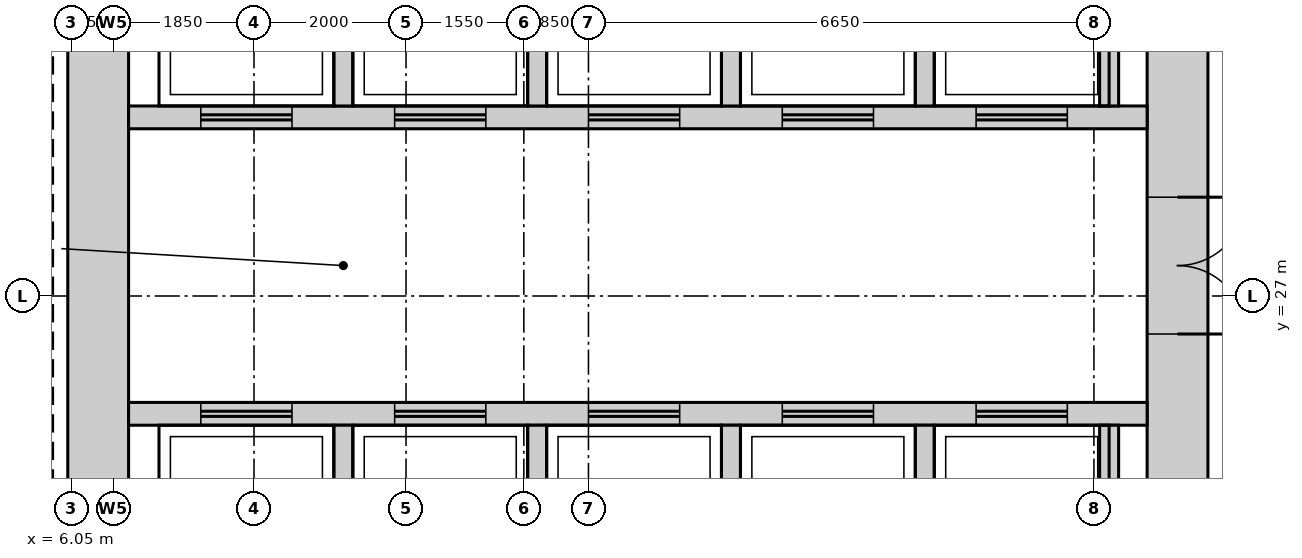
"""IFC4 building model, lengths in metres.
Left out: names, types, materials, properties, quantities, classifications, styles, units other than length and angle.
Written with IfcOpenShell. Run it as: python <this file> out.ifc"""

import sys

from ifc_helpers import new_model, si_unit, direction, frame, frame_2d, origin, place, context, subcontext, project, spatial, rectangle, extrude, source, transform, mapped, element, fill, save


model = new_model("IFC4")
c1 = context("Model", 3, precision=1e-05, world=origin(), true_north=direction((0.0, 1.0)))
c2 = subcontext(c1, "Body", "Model", "MODEL_VIEW")
j1 = project(units=[si_unit("LENGTHUNIT", "METRE"), si_unit("PLANEANGLEUNIT", "RADIAN")], contexts=[c1])
p1 = place(None, origin())
s1 = spatial("IfcSite", under=j1, at=p1, CompositionType="ELEMENT")
p2 = place(p1, origin())
s2 = spatial("IfcBuilding", under=s1, at=p2, CompositionType="ELEMENT")
p3 = place(p2, frame((0.0, 0.0, 208.7)))
s3 = spatial("IfcBuildingStorey", under=s2, at=p3, CompositionType="ELEMENT", Elevation=208.7)
m1 = source(origin(), c2, "Body", "SweptSolid", [
    extrude(rectangle(XDim=22.4, YDim=0.8, at=frame_2d((11.2, 0.0))), origin(), (0.0, 0.0, 1.0), 3.75),
])
p4 = place(p3, frame((20.6, 15.8, 0.0), z_axis=(0.0, 0.0, 1.0), x_axis=(0.0, 1.0, 0.0)))
e1 = element("IfcWall", 1, at=p4, inside=s3, PredefinedType="SHEAR", context=c2, shape_type="MappedRepresentation", body=[
    mapped(m1, transform((0.0, 0.0, 0.0))),
])
m2 = source(origin(), c2, "Body", "SweptSolid", [
    extrude(rectangle(XDim=1.8, YDim=2.1, at=frame_2d((0.9, 1.05))), frame((0.0, 0.41, 0.0), z_axis=(0.0, -1.0, 0.0), x_axis=(1.0, 0.0, 0.0)), (0.0, 0.0, 1.0), 0.82),
])
p5 = place(p4, frame((10.7, 0.0, 0.0)))
e2 = element("IfcOpeningElement", 2, at=p5, cuts=e1, PredefinedType="OPENING", context=c2, shape_type="MappedRepresentation", body=[
    mapped(m2, transform((0.0, 0.0, 0.0))),
])
m3 = source(origin(), c2, "Body", "SweptSolid", [
    extrude(rectangle(XDim=0.9, YDim=2.1, at=frame_2d((0.45, 1.05))), frame((0.0, 0.41, 0.0), z_axis=(0.0, -1.0, 0.0), x_axis=(1.0, 0.0, 0.0)), (0.0, 0.0, 1.0), 0.82),
])
p6 = place(p4, frame((0.35, 0.0, 0.0)))
e3 = element("IfcOpeningElement", 3, at=p6, cuts=e1, PredefinedType="OPENING", context=c2, shape_type="MappedRepresentation", body=[
    mapped(m3, transform((0.0, 0.0, 0.0))),
])
p7 = place(p4, frame((3.9, 0.0, 0.0)))
e4 = element("IfcOpeningElement", 4, at=p7, cuts=e1, PredefinedType="OPENING", context=c2, shape_type="MappedRepresentation", body=[
    mapped(m3, transform((0.0, 0.0, 0.0))),
])
p8 = place(p3, frame((6.4, 15.8, 0.0), z_axis=(0.0, 0.0, 1.0), x_axis=(0.0, 1.0, 0.0)))
e5 = element("IfcWall", 5, at=p8, inside=s3, PredefinedType="SHEAR", context=c2, shape_type="MappedRepresentation", body=[
    mapped(m1, transform((0.0, 0.0, 0.0))),
])
m4 = source(origin(), c2, "Body", "SweptSolid", [
    extrude(rectangle(XDim=13.4, YDim=0.3, at=frame_2d((6.7, 0.0))), origin(), (0.0, 0.0, 1.0), 3.75),
])
p9 = place(p3, frame((6.8, 29.35, 0.0), z_axis=(0.0, 0.0, 1.0), x_axis=(1.0, 0.0, 0.0)))
e6 = element("IfcWall", 6, at=p9, inside=s3, PredefinedType="STANDARD", context=c2, shape_type="MappedRepresentation", body=[
    mapped(m4, transform((0.0, 0.0, 0.0))),
])
m5 = source(origin(), c2, "Body", "SweptSolid", [
    extrude(rectangle(XDim=1.2, YDim=2.1, at=frame_2d((0.6, 1.05))), frame((0.0, 0.16, 0.0), z_axis=(0.0, -1.0, 0.0), x_axis=(1.0, 0.0, 0.0)), (0.0, 0.0, 1.0), 0.32),
])
p10 = place(p9, frame((0.95, 0.0, 0.0)))
e7 = element("IfcOpeningElement", 7, at=p10, cuts=e6, PredefinedType="OPENING", context=c2, shape_type="MappedRepresentation", body=[
    mapped(m5, transform((0.0, 0.0, 0.0))),
])
p11 = place(p9, frame((3.5, 0.0, 0.0)))
e8 = element("IfcOpeningElement", 8, at=p11, cuts=e6, PredefinedType="OPENING", context=c2, shape_type="MappedRepresentation", body=[
    mapped(m5, transform((0.0, 0.0, 0.0))),
])
p12 = place(p9, frame((6.05, 0.0, 0.0)))
e9 = element("IfcOpeningElement", 9, at=p12, cuts=e6, PredefinedType="OPENING", context=c2, shape_type="MappedRepresentation", body=[
    mapped(m5, transform((0.0, 0.0, 0.0))),
])
p13 = place(p9, frame((8.6, 0.0, 0.0)))
e10 = element("IfcOpeningElement", 10, at=p13, cuts=e6, PredefinedType="OPENING", context=c2, shape_type="MappedRepresentation", body=[
    mapped(m5, transform((0.0, 0.0, 0.0))),
])
p14 = place(p9, frame((11.15, 0.0, 0.0)))
e11 = element("IfcOpeningElement", 11, at=p14, cuts=e6, PredefinedType="OPENING", context=c2, shape_type="MappedRepresentation", body=[
    mapped(m5, transform((0.0, 0.0, 0.0))),
])
p15 = place(p3, frame((6.8, 25.45, 0.0), z_axis=(0.0, 0.0, 1.0), x_axis=(1.0, 0.0, 0.0)))
e12 = element("IfcWall", 12, at=p15, inside=s3, PredefinedType="STANDARD", context=c2, shape_type="MappedRepresentation", body=[
    mapped(m4, transform((0.0, 0.0, 0.0))),
])
p16 = place(p15, frame((0.95, 0.0, 0.0)))
e13 = element("IfcOpeningElement", 13, at=p16, cuts=e12, PredefinedType="OPENING", context=c2, shape_type="MappedRepresentation", body=[
    mapped(m5, transform((0.0, 0.0, 0.0))),
])
p17 = place(p15, frame((3.5, 0.0, 0.0)))
e14 = element("IfcOpeningElement", 14, at=p17, cuts=e12, PredefinedType="OPENING", context=c2, shape_type="MappedRepresentation", body=[
    mapped(m5, transform((0.0, 0.0, 0.0))),
])
p18 = place(p15, frame((6.05, 0.0, 0.0)))
e15 = element("IfcOpeningElement", 15, at=p18, cuts=e12, PredefinedType="OPENING", context=c2, shape_type="MappedRepresentation", body=[
    mapped(m5, transform((0.0, 0.0, 0.0))),
])
p19 = place(p15, frame((8.6, 0.0, 0.0)))
e16 = element("IfcOpeningElement", 16, at=p19, cuts=e12, PredefinedType="OPENING", context=c2, shape_type="MappedRepresentation", body=[
    mapped(m5, transform((0.0, 0.0, 0.0))),
])
p20 = place(p15, frame((11.15, 0.0, 0.0)))
e17 = element("IfcOpeningElement", 17, at=p20, cuts=e12, PredefinedType="OPENING", context=c2, shape_type="MappedRepresentation", body=[
    mapped(m5, transform((0.0, 0.0, 0.0))),
])
m6 = source(origin(), c2, "Body", "SweptSolid", [
    extrude(rectangle(XDim=2.4, YDim=0.25, at=frame_2d((1.2, 0.0))), origin(), (0.0, 0.0, 1.0), 3.75),
])
for number, where, z_axis, x_axis in (
    (18, (17.275, 29.5, 0.0), (0.0, 0.0, 1.0), (0.0, 1.0, 0.0)),
    (19, (19.7, 29.5, 0.0), (0.0, 0.0, 1.0), (0.0, 1.0, 0.0)),
    (20, (9.625, 29.5, 0.0), (0.0, 0.0, 1.0), (0.0, 1.0, 0.0)),
    (21, (12.175, 29.5, 0.0), (0.0, 0.0, 1.0), (0.0, 1.0, 0.0)),
    (22, (14.725, 29.5, 0.0), (0.0, 0.0, 1.0), (0.0, 1.0, 0.0)),
):
    element("IfcWall", number, at=place(p3, frame(where, z_axis=z_axis, x_axis=x_axis)), inside=s3, PredefinedType="STANDARD", context=c2, shape_type="MappedRepresentation", body=[
        mapped(m6, transform((0.0, 0.0, 0.0))),
    ])
m7 = source(origin(), c2, "Body", "SweptSolid", [
    extrude(rectangle(XDim=2.4, YDim=0.25, at=frame_2d((1.2, 0.0))), origin(), (0.0, 0.0, 1.0), 3.75),
])
for number, where, z_axis, x_axis in (
    (23, (17.275, 22.9, 0.0), (0.0, 0.0, 1.0), (0.0, 1.0, 0.0)),
    (24, (19.7, 22.9, 0.0), (0.0, 0.0, 1.0), (0.0, 1.0, 0.0)),
    (25, (9.625, 22.9, 0.0), (0.0, 0.0, 1.0), (0.0, 1.0, 0.0)),
    (26, (12.175, 22.9, 0.0), (0.0, 0.0, 1.0), (0.0, 1.0, 0.0)),
    (27, (14.725, 22.9, 0.0), (0.0, 0.0, 1.0), (0.0, 1.0, 0.0)),
):
    element("IfcWall", number, at=place(p3, frame(where, z_axis=z_axis, x_axis=x_axis)), inside=s3, PredefinedType="STANDARD", context=c2, shape_type="MappedRepresentation", body=[
        mapped(m7, transform((0.0, 0.0, 0.0))),
    ])
m8 = source(origin(), c2, "Body", "SweptSolid", [
    extrude(rectangle(XDim=1.8, YDim=2.1, at=frame_2d((0.9, 1.05))), frame((0.0, 0.35, 0.0), z_axis=(0.0, -1.0, 0.0), x_axis=(1.0, 0.0, 0.0)), (0.0, 0.0, 1.0), 0.7),
])
p21 = place(p5, origin())
e28 = element("IfcDoor", 28, at=p21, inside=s3, OperationType="DOUBLE_DOOR_SINGLE_SWING", PredefinedType="DOOR", context=c2, shape_type="MappedRepresentation", body=[
    mapped(m8, transform((0.0, 0.0, 0.0))),
])
fill(e2, e28)
m9 = source(origin(), c2, "Body", "SweptSolid", [
    extrude(rectangle(XDim=1.2, YDim=2.1, at=frame_2d((0.6, 1.05))), frame((0.0, 0.025, 0.0), z_axis=(0.0, -1.0, 0.0), x_axis=(1.0, 0.0, 0.0)), (0.0, 0.0, 1.0), 0.05),
])
p22 = place(p16, origin())
e29 = element("IfcDoor", 29, at=p22, inside=s3, OperationType="DOUBLE_DOOR_SLIDING", PredefinedType="DOOR", context=c2, shape_type="MappedRepresentation", body=[
    mapped(m9, transform((0.0, 0.0, 0.0))),
])
fill(e13, e29)
p23 = place(p17, origin())
e30 = element("IfcDoor", 30, at=p23, inside=s3, OperationType="DOUBLE_DOOR_SLIDING", PredefinedType="DOOR", context=c2, shape_type="MappedRepresentation", body=[
    mapped(m9, transform((0.0, 0.0, 0.0))),
])
fill(e14, e30)
p24 = place(p18, origin())
e31 = element("IfcDoor", 31, at=p24, inside=s3, OperationType="DOUBLE_DOOR_SLIDING", PredefinedType="DOOR", context=c2, shape_type="MappedRepresentation", body=[
    mapped(m9, transform((0.0, 0.0, 0.0))),
])
fill(e15, e31)
p25 = place(p19, origin())
e32 = element("IfcDoor", 32, at=p25, inside=s3, OperationType="DOUBLE_DOOR_SLIDING", PredefinedType="DOOR", context=c2, shape_type="MappedRepresentation", body=[
    mapped(m9, transform((0.0, 0.0, 0.0))),
])
fill(e16, e32)
p26 = place(p20, origin())
e33 = element("IfcDoor", 33, at=p26, inside=s3, OperationType="DOUBLE_DOOR_SLIDING", PredefinedType="DOOR", context=c2, shape_type="MappedRepresentation", body=[
    mapped(m9, transform((0.0, 0.0, 0.0))),
])
fill(e17, e33)
p27 = place(p10, origin())
e34 = element("IfcDoor", 34, at=p27, inside=s3, OperationType="DOUBLE_DOOR_SLIDING", PredefinedType="DOOR", context=c2, shape_type="MappedRepresentation", body=[
    mapped(m9, transform((0.0, 0.0, 0.0))),
])
fill(e7, e34)
p28 = place(p11, origin())
e35 = element("IfcDoor", 35, at=p28, inside=s3, OperationType="DOUBLE_DOOR_SLIDING", PredefinedType="DOOR", context=c2, shape_type="MappedRepresentation", body=[
    mapped(m9, transform((0.0, 0.0, 0.0))),
])
fill(e8, e35)
p29 = place(p12, origin())
e36 = element("IfcDoor", 36, at=p29, inside=s3, OperationType="DOUBLE_DOOR_SLIDING", PredefinedType="DOOR", context=c2, shape_type="MappedRepresentation", body=[
    mapped(m9, transform((0.0, 0.0, 0.0))),
])
fill(e9, e36)
p30 = place(p13, origin())
e37 = element("IfcDoor", 37, at=p30, inside=s3, OperationType="DOUBLE_DOOR_SLIDING", PredefinedType="DOOR", context=c2, shape_type="MappedRepresentation", body=[
    mapped(m9, transform((0.0, 0.0, 0.0))),
])
fill(e10, e37)
p31 = place(p14, origin())
e38 = element("IfcDoor", 38, at=p31, inside=s3, OperationType="DOUBLE_DOOR_SLIDING", PredefinedType="DOOR", context=c2, shape_type="MappedRepresentation", body=[
    mapped(m9, transform((0.0, 0.0, 0.0))),
])
fill(e11, e38)
save(model, sys.argv[1])
